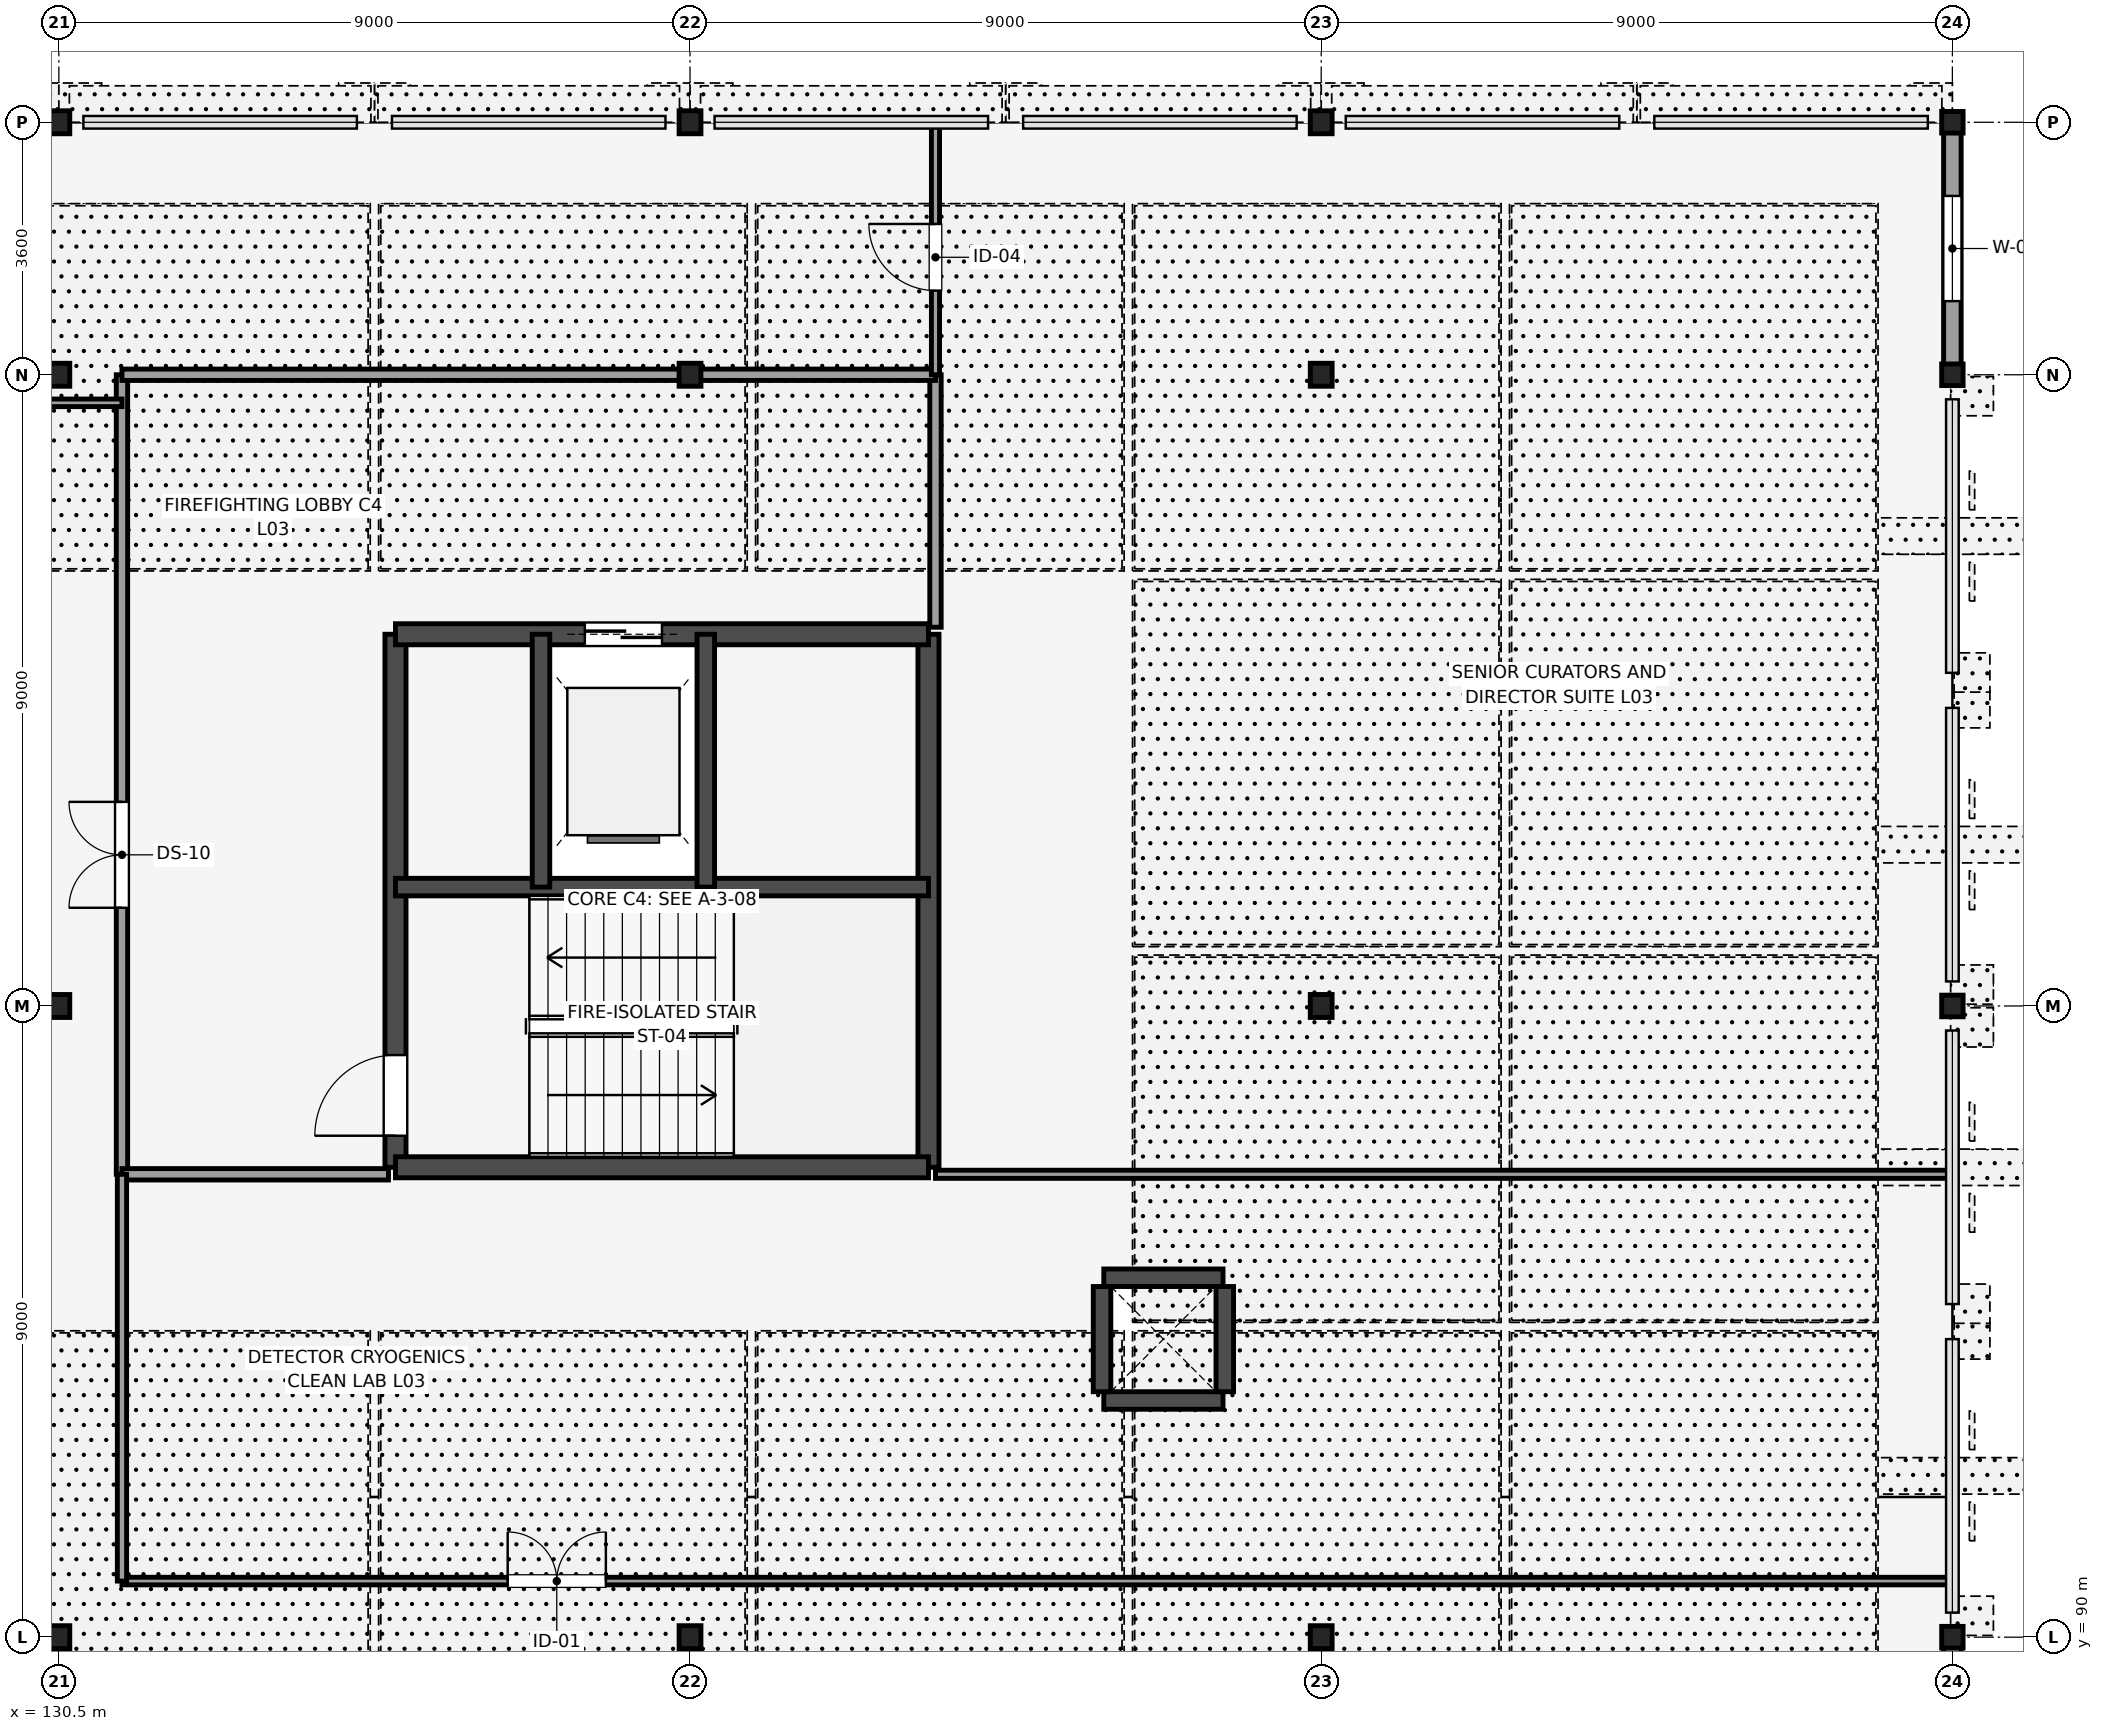
"""IFC4 building model, lengths in metres.
Left out: names, types, materials, properties, quantities, classifications, styles, units other than length and angle.
Written with IfcOpenShell. Run it as: python <this file> out.ifc"""

import sys

from ifc_helpers import new_model, si_unit, direction, frame, frame_2d, origin, origin_2d, place, context, subcontext, project, spatial, rectangle, i_section, extrude, element, fill, save


model = new_model("IFC4")
c1 = context("Model", 3, precision=1e-05, world=origin(), true_north=direction((0.0, 1.0)))
c2 = subcontext(c1, "Body", "Model", "MODEL_VIEW")
j1 = project(units=[si_unit("LENGTHUNIT", "METRE"), si_unit("PLANEANGLEUNIT", "RADIAN")], contexts=[c1])
p1 = place(None, origin())
s1 = spatial("IfcSite", under=j1, at=p1, CompositionType="ELEMENT")
p2 = place(p1, origin())
s2 = spatial("IfcBuilding", under=s1, at=p2, CompositionType="ELEMENT")
p3 = place(p2, frame((0.0, 0.0, 14.4)))
s3 = spatial("IfcBuildingStorey", under=s2, at=p3, CompositionType="ELEMENT", Elevation=14.4)
for number, where, z_axis, x_axis in (
    (1, (130.5, 90.0, 0.0), (0.0, 0.0, 1.0), (1.0, 0.0, 0.0)),
    (2, (130.5, 99.0, 0.0), (0.0, 0.0, 1.0), (1.0, 0.0, 0.0)),
    (3, (130.5, 108.0, 0.0), (0.0, 0.0, 1.0), (1.0, 0.0, 0.0)),
    (4, (130.5, 111.6, 0.0), (0.0, 0.0, 1.0), (1.0, 0.0, 0.0)),
    (5, (139.5, 90.0, 0.0), (0.0, 0.0, 1.0), (1.0, 0.0, 0.0)),
    (6, (139.5, 108.0, 0.0), (0.0, 0.0, 1.0), (1.0, 0.0, 0.0)),
    (7, (139.5, 111.6, 0.0), (0.0, 0.0, 1.0), (1.0, 0.0, 0.0)),
    (8, (148.5, 90.0, 0.0), (0.0, 0.0, 1.0), (1.0, 0.0, 0.0)),
    (9, (148.5, 99.0, 0.0), (0.0, 0.0, 1.0), (1.0, 0.0, 0.0)),
    (10, (148.5, 108.0, 0.0), (0.0, 0.0, 1.0), (1.0, 0.0, 0.0)),
    (11, (148.5, 111.6, 0.0), (0.0, 0.0, 1.0), (1.0, 0.0, 0.0)),
):
    element("IfcColumn", number, at=place(p3, frame(where, z_axis=z_axis, x_axis=x_axis)), inside=s3, PredefinedType="COLUMN", context=c2, shape_type="SweptSolid", body=[
        extrude(i_section(OverallWidth=0.311, OverallDepth=0.327, WebThickness=0.016, FlangeThickness=0.025, FilletRadius=0.017, at=origin_2d()), origin(), (0.0, 0.0, 1.0), 4.5),
    ])
for number, where, z_axis, x_axis in (
    (12, (157.5, 90.0, 0.0), (0.0, 0.0, 1.0), (1.0, 0.0, 0.0)),
    (13, (157.5, 99.0, 0.0), (0.0, 0.0, 1.0), (1.0, 0.0, 0.0)),
    (14, (157.5, 108.0, 0.0), (0.0, 0.0, 1.0), (1.0, 0.0, 0.0)),
    (15, (157.5, 111.6, 0.0), (0.0, 0.0, 1.0), (1.0, 0.0, 0.0)),
):
    element("IfcColumn", number, at=place(p3, frame(where, z_axis=z_axis, x_axis=x_axis)), inside=s3, PredefinedType="COLUMN", context=c2, shape_type="SweptSolid", body=[
        extrude(i_section(OverallWidth=0.305, OverallDepth=0.308, WebThickness=0.01, FlangeThickness=0.015, FilletRadius=0.017, at=origin_2d()), origin(), (0.0, 0.0, 1.0), 4.5),
    ])
p4 = place(p3, frame((135.3, 96.7, 0.0), z_axis=(0.0, 0.0, 1.0), x_axis=(0.0, 1.0, 0.0)))
e16 = element("IfcWall", 16, at=p4, inside=s3, PredefinedType="SHEAR", context=c2, shape_type="SweptSolid", body=[
    extrude(rectangle(XDim=7.6, YDim=0.3, at=frame_2d((3.8, 0.0))), origin(), (0.0, 0.0, 1.0), 4.5),
])
p5 = place(p4, frame((0.45, 0.0, 0.0)))
e17 = element("IfcOpeningElement", 17, at=p5, cuts=e16, PredefinedType="OPENING", context=c2, shape_type="SweptSolid", body=[
    extrude(rectangle(XDim=1.15, YDim=2.15, at=frame_2d((0.575, 1.075))), frame((0.0, 0.16, 0.0), z_axis=(0.0, -1.0, 0.0), x_axis=(1.0, 0.0, 0.0)), (0.0, 0.0, 1.0), 0.32),
])
p6 = place(p3, frame((142.9, 96.7, 0.0), z_axis=(0.0, 0.0, 1.0), x_axis=(0.0, 1.0, 0.0)))
e18 = element("IfcWall", 18, at=p6, inside=s3, PredefinedType="SHEAR", context=c2, shape_type="SweptSolid", body=[
    extrude(rectangle(XDim=7.6, YDim=0.3, at=frame_2d((3.8, 0.0))), origin(), (0.0, 0.0, 1.0), 4.5),
])
p7 = place(p3, frame((135.3, 96.7, 0.0), z_axis=(0.0, 0.0, 1.0), x_axis=(1.0, 0.0, 0.0)))
e19 = element("IfcWall", 19, at=p7, inside=s3, PredefinedType="SHEAR", context=c2, shape_type="SweptSolid", body=[
    extrude(rectangle(XDim=7.6, YDim=0.3, at=frame_2d((3.8, 0.0))), origin(), (0.0, 0.0, 1.0), 4.5),
])
p8 = place(p3, frame((135.3, 104.3, 0.0), z_axis=(0.0, 0.0, 1.0), x_axis=(1.0, 0.0, 0.0)))
e20 = element("IfcWall", 20, at=p8, inside=s3, PredefinedType="SHEAR", context=c2, shape_type="SweptSolid", body=[
    extrude(rectangle(XDim=7.6, YDim=0.3, at=frame_2d((3.8, 0.0))), origin(), (0.0, 0.0, 1.0), 4.5),
])
p9 = place(p8, frame((2.7, 0.0, 0.0)))
e21 = element("IfcOpeningElement", 21, at=p9, cuts=e20, PredefinedType="OPENING", context=c2, shape_type="SweptSolid", body=[
    extrude(rectangle(XDim=1.1, YDim=2.2, at=frame_2d((0.55, 1.1))), frame((0.0, 0.16, 0.0), z_axis=(0.0, -1.0, 0.0), x_axis=(1.0, 0.0, 0.0)), (0.0, 0.0, 1.0), 0.32),
])
p10 = place(p3, frame((135.3, 100.695, 0.0), z_axis=(0.0, 0.0, 1.0), x_axis=(1.0, 0.0, 0.0)))
e22 = element("IfcWall", 22, at=p10, inside=s3, PredefinedType="SHEAR", context=c2, shape_type="SweptSolid", body=[
    extrude(rectangle(XDim=7.6, YDim=0.25, at=frame_2d((3.8, 0.0))), origin(), (0.0, 0.0, 1.0), 4.5),
])
for number, where, z_axis, x_axis in (
    (23, (137.375, 100.695, 0.0), (0.0, 0.0, 1.0), (0.0, 1.0, 0.0)),
    (24, (139.725, 100.695, 0.0), (0.0, 0.0, 1.0), (0.0, 1.0, 0.0)),
):
    element("IfcWall", number, at=place(p3, frame(where, z_axis=z_axis, x_axis=x_axis)), inside=s3, PredefinedType="SHEAR", context=c2, shape_type="SweptSolid", body=[
        extrude(rectangle(XDim=3.605, YDim=0.25, at=frame_2d((1.802, 0.0))), origin(), (0.0, 0.0, 1.0), 4.5),
    ])
for number, where, z_axis, x_axis in (
    (25, (145.4, 93.375, 0.0), (0.0, 0.0, 1.0), (1.0, 0.0, 0.0)),
    (26, (145.4, 95.125, 0.0), (0.0, 0.0, 1.0), (1.0, 0.0, 0.0)),
):
    element("IfcWall", number, at=place(p3, frame(where, z_axis=z_axis, x_axis=x_axis)), inside=s3, PredefinedType="SHEAR", context=c2, shape_type="SweptSolid", body=[
        extrude(rectangle(XDim=1.7, YDim=0.25, at=frame_2d((0.85, 0.0))), origin(), (0.0, 0.0, 1.0), 3.77),
    ])
for number, where, z_axis, x_axis in (
    (27, (145.375, 93.5, 0.0), (0.0, 0.0, 1.0), (0.0, 1.0, 0.0)),
    (28, (147.125, 93.5, 0.0), (0.0, 0.0, 1.0), (0.0, 1.0, 0.0)),
):
    element("IfcWall", number, at=place(p3, frame(where, z_axis=z_axis, x_axis=x_axis)), inside=s3, PredefinedType="SHEAR", context=c2, shape_type="SweptSolid", body=[
        extrude(rectangle(XDim=1.5, YDim=0.25, at=frame_2d((0.75, 0.0))), origin(), (0.0, 0.0, 1.0), 3.77),
    ])
p11 = place(p3, frame((157.5, 81.0, 0.0), z_axis=(0.0, 0.0, 1.0), x_axis=(0.0, 1.0, 0.0)))
e29 = element("IfcWall", 29, at=p11, inside=s3, PredefinedType="STANDARD", context=c2, shape_type="SweptSolid", body=[
    extrude(rectangle(XDim=9.0, YDim=0.25, at=frame_2d((4.5, 0.0))), origin(), (0.0, 0.0, 1.0), 3.846),
])
p12 = place(p3, frame((157.5, 108.0, 0.0), z_axis=(0.0, 0.0, 1.0), x_axis=(0.0, 1.0, 0.0)))
e30 = element("IfcWall", 30, at=p12, inside=s3, PredefinedType="STANDARD", context=c2, shape_type="SweptSolid", body=[
    extrude(rectangle(XDim=3.6, YDim=0.25, at=frame_2d((1.8, 0.0))), origin(), (0.0, 0.0, 1.0), 3.846),
])
p13 = place(p12, frame((1.05, 0.0, 1.0)))
e31 = element("IfcOpeningElement", 31, at=p13, cuts=e30, PredefinedType="OPENING", context=c2, shape_type="SweptSolid", body=[
    extrude(rectangle(XDim=1.5, YDim=1.5, at=frame_2d((0.75, 0.75))), frame((0.0, 0.135, 0.0), z_axis=(0.0, -1.0, 0.0), x_axis=(1.0, 0.0, 0.0)), (0.0, 0.0, 1.0), 0.27),
])
p14 = place(p3, frame((131.4, 96.6, 0.0), z_axis=(0.0, 0.0, 1.0), x_axis=(0.0, 1.0, 0.0)))
e32 = element("IfcWall", 32, at=p14, inside=s3, PredefinedType="PARTITIONING", context=c2, shape_type="SweptSolid", body=[
    extrude(rectangle(XDim=11.4, YDim=0.162, at=frame_2d((5.7, 0.0))), origin(), (0.0, 0.0, 1.0), 4.32),
])
p15 = place(p14, frame((3.8, 0.0, 0.0)))
e33 = element("IfcOpeningElement", 33, at=p15, cuts=e32, PredefinedType="OPENING", context=c2, shape_type="SweptSolid", body=[
    extrude(rectangle(XDim=1.51, YDim=2.175, at=frame_2d((0.755, 1.087))), frame((0.0, 0.091, 0.0), z_axis=(0.0, -1.0, 0.0), x_axis=(1.0, 0.0, 0.0)), (0.0, 0.0, 1.0), 0.182),
])
p16 = place(p3, frame((131.4, 96.6, 0.0), z_axis=(0.0, 0.0, 1.0), x_axis=(1.0, 0.0, 0.0)))
e34 = element("IfcWall", 34, at=p16, inside=s3, PredefinedType="PARTITIONING", context=c2, shape_type="SweptSolid", body=[
    extrude(rectangle(XDim=3.8, YDim=0.162, at=frame_2d((1.9, 0.0))), origin(), (0.0, 0.0, 1.0), 4.32),
])
p17 = place(p3, frame((143.0, 104.4, 0.0), z_axis=(0.0, 0.0, 1.0), x_axis=(0.0, 1.0, 0.0)))
e35 = element("IfcWall", 35, at=p17, inside=s3, PredefinedType="PARTITIONING", context=c2, shape_type="SweptSolid", body=[
    extrude(rectangle(XDim=3.6, YDim=0.162, at=frame_2d((1.8, 0.0))), origin(), (0.0, 0.0, 1.0), 4.32),
])
p18 = place(p3, frame((131.4, 108.0, 0.0), z_axis=(0.0, 0.0, 1.0), x_axis=(1.0, 0.0, 0.0)))
e36 = element("IfcWall", 36, at=p18, inside=s3, PredefinedType="PARTITIONING", context=c2, shape_type="SweptSolid", body=[
    extrude(rectangle(XDim=11.6, YDim=0.162, at=frame_2d((5.8, 0.0))), origin(), (0.0, 0.0, 1.0), 3.816),
])
p19 = place(p3, frame((116.8, 107.6, 0.0), z_axis=(0.0, 0.0, 1.0), x_axis=(1.0, 0.0, 0.0)))
e37 = element("IfcWall", 37, at=p19, inside=s3, PredefinedType="PARTITIONING", context=c2, shape_type="SweptSolid", body=[
    extrude(rectangle(XDim=14.6, YDim=0.108, at=frame_2d((7.3, 0.0))), origin(), (0.0, 0.0, 1.0), 4.32),
])
p20 = place(p19, frame((5.8, 0.0, 0.0)))
e38 = element("IfcOpeningElement", 38, at=p20, cuts=e37, PredefinedType="OPENING", context=c2, shape_type="SweptSolid", body=[
    extrude(rectangle(XDim=2.0, YDim=2.4, at=frame_2d((1.0, 1.2))), frame((0.0, 0.064, 0.0), z_axis=(0.0, -1.0, 0.0), x_axis=(1.0, 0.0, 0.0)), (0.0, 0.0, 1.0), 0.128),
])
p21 = place(p3, frame((131.4, 90.8, 0.0), z_axis=(0.0, 0.0, 1.0), x_axis=(1.0, 0.0, 0.0)))
e39 = element("IfcWall", 39, at=p21, inside=s3, PredefinedType="PARTITIONING", context=c2, shape_type="SweptSolid", body=[
    extrude(rectangle(XDim=26.1, YDim=0.108, at=frame_2d((13.05, 0.0))), origin(), (0.0, 0.0, 1.0), 4.32),
])
p22 = place(p21, frame((5.5, 0.0, 0.0)))
e40 = element("IfcOpeningElement", 40, at=p22, cuts=e39, PredefinedType="OPENING", context=c2, shape_type="SweptSolid", body=[
    extrude(rectangle(XDim=1.4, YDim=2.2, at=frame_2d((0.7, 1.1))), frame((0.0, 0.064, 0.0), z_axis=(0.0, -1.0, 0.0), x_axis=(1.0, 0.0, 0.0)), (0.0, 0.0, 1.0), 0.128),
])
p23 = place(p3, frame((131.4, 90.8, 0.0), z_axis=(0.0, 0.0, 1.0), x_axis=(0.0, 1.0, 0.0)))
e41 = element("IfcWall", 41, at=p23, inside=s3, PredefinedType="PARTITIONING", context=c2, shape_type="SweptSolid", body=[
    extrude(rectangle(XDim=5.8, YDim=0.132, at=frame_2d((2.9, 0.0))), origin(), (0.0, 0.0, 1.0), 4.32),
])
p24 = place(p3, frame((143.0, 96.6, 0.0), z_axis=(0.0, 0.0, 1.0), x_axis=(1.0, 0.0, 0.0)))
e42 = element("IfcWall", 42, at=p24, inside=s3, PredefinedType="PARTITIONING", context=c2, shape_type="SweptSolid", body=[
    extrude(rectangle(XDim=14.5, YDim=0.116, at=frame_2d((7.25, 0.0))), origin(), (0.0, 0.0, 1.0), 4.32),
])
p25 = place(p3, frame((143.0, 108.0, 0.0), z_axis=(0.0, 0.0, 1.0), x_axis=(0.0, 1.0, 0.0)))
e43 = element("IfcWall", 43, at=p25, inside=s3, PredefinedType="PARTITIONING", context=c2, shape_type="SweptSolid", body=[
    extrude(rectangle(XDim=3.6, YDim=0.116, at=frame_2d((1.8, 0.0))), origin(), (0.0, 0.0, 1.0), 4.32),
])
p26 = place(p25, frame((1.2, 0.0, 0.0)))
e44 = element("IfcOpeningElement", 44, at=p26, cuts=e43, PredefinedType="OPENING", context=c2, shape_type="SweptSolid", body=[
    extrude(rectangle(XDim=0.95, YDim=2.15, at=frame_2d((0.475, 1.075))), frame((0.0, 0.068, 0.0), z_axis=(0.0, -1.0, 0.0), x_axis=(1.0, 0.0, 0.0)), (0.0, 0.0, 1.0), 0.136),
])
p27 = place(p13, origin())
e45 = element("IfcWindow", 45, at=p27, inside=s3, PartitioningType="SINGLE_PANEL", PredefinedType="WINDOW", context=c2, shape_type="SweptSolid", body=[
    extrude(rectangle(XDim=1.5, YDim=1.5, at=frame_2d((0.75, 0.75))), frame((0.0, 0.03, 0.0), z_axis=(0.0, -1.0, 0.0), x_axis=(1.0, 0.0, 0.0)), (0.0, 0.0, 1.0), 0.06),
])
fill(e31, e45)
p28 = place(p5, origin())
e46 = element("IfcDoor", 46, at=p28, inside=s3, OperationType="SINGLE_SWING_LEFT", PredefinedType="DOOR", context=c2, shape_type="SweptSolid", body=[
    extrude(rectangle(XDim=1.15, YDim=2.15, at=frame_2d((0.575, 1.075))), frame((0.0, 0.025, 0.0), z_axis=(0.0, -1.0, 0.0), x_axis=(1.0, 0.0, 0.0)), (0.0, 0.0, 1.0), 0.05),
])
fill(e17, e46)
p29 = place(p9, origin())
e47 = element("IfcDoor", 47, at=p29, inside=s3, OperationType="DOUBLE_DOOR_SLIDING", PredefinedType="DOOR", context=c2, shape_type="SweptSolid", body=[
    extrude(rectangle(XDim=1.1, YDim=2.2, at=frame_2d((0.55, 1.1))), frame((0.0, 0.025, 0.0), z_axis=(0.0, -1.0, 0.0), x_axis=(1.0, 0.0, 0.0)), (0.0, 0.0, 1.0), 0.05),
])
fill(e21, e47)
p30 = place(p15, origin())
e48 = element("IfcDoor", 48, at=p30, inside=s3, OperationType="DOUBLE_DOOR_SINGLE_SWING", PredefinedType="DOOR", context=c2, shape_type="SweptSolid", body=[
    extrude(rectangle(XDim=1.51, YDim=2.175, at=frame_2d((0.755, 1.087))), frame((0.0, 0.025, 0.0), z_axis=(0.0, -1.0, 0.0), x_axis=(1.0, 0.0, 0.0)), (0.0, 0.0, 1.0), 0.05),
])
fill(e33, e48)
p31 = place(p22, origin())
e49 = element("IfcDoor", 49, at=p31, inside=s3, OperationType="DOUBLE_DOOR_SINGLE_SWING", PredefinedType="DOOR", context=c2, shape_type="SweptSolid", body=[
    extrude(rectangle(XDim=1.4, YDim=2.2, at=frame_2d((0.7, 1.1))), frame((0.0, 0.025, 0.0), z_axis=(0.0, -1.0, 0.0), x_axis=(1.0, 0.0, 0.0)), (0.0, 0.0, 1.0), 0.05),
])
fill(e40, e49)
p32 = place(p26, origin())
e50 = element("IfcDoor", 50, at=p32, inside=s3, OperationType="SINGLE_SWING_RIGHT", PredefinedType="DOOR", context=c2, shape_type="SweptSolid", body=[
    extrude(rectangle(XDim=0.95, YDim=2.15, at=frame_2d((0.475, 1.075))), frame((0.0, 0.025, 0.0), z_axis=(0.0, -1.0, 0.0), x_axis=(1.0, 0.0, 0.0)), (0.0, 0.0, 1.0), 0.05),
])
fill(e44, e50)
save(model, sys.argv[1])
